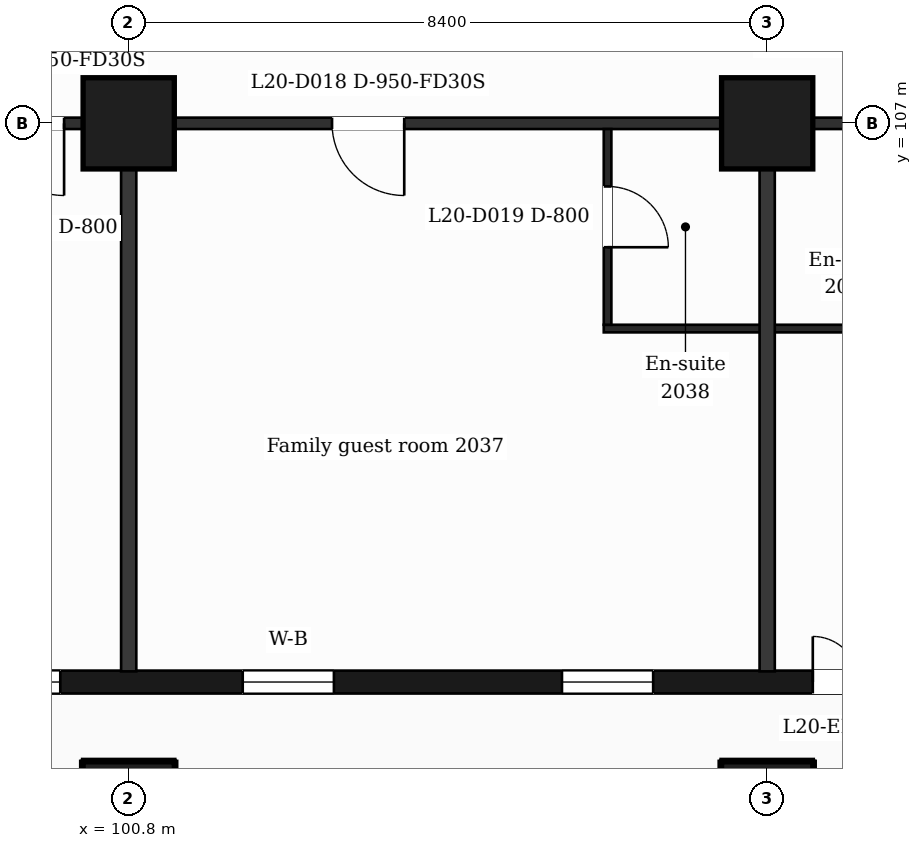
"""IFC4 building model, lengths in metres.
Left out: names, types, materials, properties, quantities, classifications, styles, units other than length and angle.
Written with IfcOpenShell. Run it as: python <this file> out.ifc"""

import sys

from ifc_helpers import new_model, si_unit, direction, frame, frame_2d, origin, origin_2d, place, context, subcontext, project, spatial, rectangle, extrude, element, fill, save


model = new_model("IFC4")
c1 = context("Model", 3, precision=1e-05, world=origin(), true_north=direction((0.0, 1.0)))
c2 = subcontext(c1, "Body", "Model", "MODEL_VIEW")
j1 = project(units=[si_unit("LENGTHUNIT", "METRE"), si_unit("PLANEANGLEUNIT", "RADIAN")], contexts=[c1])
p1 = place(None, origin())
s1 = spatial("IfcSite", under=j1, at=p1, CompositionType="ELEMENT")
p2 = place(p1, origin())
s2 = spatial("IfcBuilding", under=s1, at=p2, CompositionType="ELEMENT")
p3 = place(p2, frame((0.0, 0.0, 91.0)))
s3 = spatial("IfcBuildingStorey", under=s2, at=p3, CompositionType="ELEMENT", Elevation=91.0)
for number, where, z_axis, x_axis in (
    (1, (100.8, 98.0, 0.0), (0.0, 0.0, 1.0), (1.0, 0.0, 0.0)),
    (2, (109.2, 98.0, 0.0), (0.0, 0.0, 1.0), (1.0, 0.0, 0.0)),
    (3, (100.8, 107.0, 0.0), (0.0, 0.0, 1.0), (1.0, 0.0, 0.0)),
    (4, (109.2, 107.0, 0.0), (0.0, 0.0, 1.0), (1.0, 0.0, 0.0)),
):
    element("IfcColumn", number, at=place(p3, frame(where, z_axis=z_axis, x_axis=x_axis)), inside=s3, PredefinedType="COLUMN", context=c2, shape_type="SweptSolid", body=[
        extrude(rectangle(XDim=1.2, YDim=1.2, at=origin_2d()), origin(), (0.0, 0.0, 1.0), 3.7),
    ])
p4 = place(p3, frame((89.85, 99.65, 0.0), z_axis=(0.0, 0.0, 1.0), x_axis=(1.0, 0.0, 0.0)))
e5 = element("IfcWall", 5, at=p4, inside=s3, PredefinedType="SOLIDWALL", context=c2, shape_type="SweptSolid", body=[
    extrude(rectangle(XDim=47.25, YDim=0.3, at=frame_2d((23.625, 0.0))), origin(), (0.0, 0.0, 1.0), 3.38),
])
p5 = place(p4, frame((0.725, 0.0, 0.9)))
e6 = element("IfcOpeningElement", 6, at=p5, cuts=e5, PredefinedType="OPENING", context=c2, shape_type="SweptSolid", body=[
    extrude(rectangle(XDim=1.2, YDim=2.1, at=frame_2d((0.6, 1.05))), frame((0.0, 0.16, 0.0), z_axis=(0.0, -1.0, 0.0), x_axis=(1.0, 0.0, 0.0)), (0.0, 0.0, 1.0), 0.32),
])
p6 = place(p4, frame((3.45, 0.0, 0.9)))
e7 = element("IfcOpeningElement", 7, at=p6, cuts=e5, PredefinedType="OPENING", context=c2, shape_type="SweptSolid", body=[
    extrude(rectangle(XDim=2.4, YDim=2.1, at=frame_2d((1.2, 1.05))), frame((0.0, 0.16, 0.0), z_axis=(0.0, -1.0, 0.0), x_axis=(1.0, 0.0, 0.0)), (0.0, 0.0, 1.0), 0.32),
])
p7 = place(p4, frame((7.65, 0.0, 0.9)))
e8 = element("IfcOpeningElement", 8, at=p7, cuts=e5, PredefinedType="OPENING", context=c2, shape_type="SweptSolid", body=[
    extrude(rectangle(XDim=2.4, YDim=2.1, at=frame_2d((1.2, 1.05))), frame((0.0, 0.16, 0.0), z_axis=(0.0, -1.0, 0.0), x_axis=(1.0, 0.0, 0.0)), (0.0, 0.0, 1.0), 0.32),
])
p8 = place(p4, frame((12.45, 0.0, 0.9)))
e9 = element("IfcOpeningElement", 9, at=p8, cuts=e5, PredefinedType="OPENING", context=c2, shape_type="SweptSolid", body=[
    extrude(rectangle(XDim=1.2, YDim=2.1, at=frame_2d((0.6, 1.05))), frame((0.0, 0.16, 0.0), z_axis=(0.0, -1.0, 0.0), x_axis=(1.0, 0.0, 0.0)), (0.0, 0.0, 1.0), 0.32),
])
p9 = place(p4, frame((16.65, 0.0, 0.9)))
e10 = element("IfcOpeningElement", 10, at=p9, cuts=e5, PredefinedType="OPENING", context=c2, shape_type="SweptSolid", body=[
    extrude(rectangle(XDim=1.2, YDim=2.1, at=frame_2d((0.6, 1.05))), frame((0.0, 0.16, 0.0), z_axis=(0.0, -1.0, 0.0), x_axis=(1.0, 0.0, 0.0)), (0.0, 0.0, 1.0), 0.32),
])
p10 = place(p4, frame((19.95, 0.0, 0.0)))
e11 = element("IfcOpeningElement", 11, at=p10, cuts=e5, PredefinedType="OPENING", context=c2, shape_type="SweptSolid", body=[
    extrude(rectangle(XDim=1.2, YDim=2.4, at=frame_2d((0.6, 1.2))), frame((0.0, 0.16, 0.0), z_axis=(0.0, -1.0, 0.0), x_axis=(1.0, 0.0, 0.0)), (0.0, 0.0, 1.0), 0.32),
])
p11 = place(p4, frame((21.75, 0.0, 0.9)))
e12 = element("IfcOpeningElement", 12, at=p11, cuts=e5, PredefinedType="OPENING", context=c2, shape_type="SweptSolid", body=[
    extrude(rectangle(XDim=1.2, YDim=2.1, at=frame_2d((0.6, 1.05))), frame((0.0, 0.16, 0.0), z_axis=(0.0, -1.0, 0.0), x_axis=(1.0, 0.0, 0.0)), (0.0, 0.0, 1.0), 0.32),
])
p12 = place(p4, frame((24.45, 0.0, 0.9)))
e13 = element("IfcOpeningElement", 13, at=p12, cuts=e5, PredefinedType="OPENING", context=c2, shape_type="SweptSolid", body=[
    extrude(rectangle(XDim=2.4, YDim=2.1, at=frame_2d((1.2, 1.05))), frame((0.0, 0.16, 0.0), z_axis=(0.0, -1.0, 0.0), x_axis=(1.0, 0.0, 0.0)), (0.0, 0.0, 1.0), 0.32),
])
p13 = place(p4, frame((28.35, 0.0, 0.0)))
e14 = element("IfcOpeningElement", 14, at=p13, cuts=e5, PredefinedType="OPENING", context=c2, shape_type="SweptSolid", body=[
    extrude(rectangle(XDim=1.2, YDim=2.4, at=frame_2d((0.6, 1.2))), frame((0.0, 0.16, 0.0), z_axis=(0.0, -1.0, 0.0), x_axis=(1.0, 0.0, 0.0)), (0.0, 0.0, 1.0), 0.32),
])
p14 = place(p4, frame((30.15, 0.0, 0.9)))
e15 = element("IfcOpeningElement", 15, at=p14, cuts=e5, PredefinedType="OPENING", context=c2, shape_type="SweptSolid", body=[
    extrude(rectangle(XDim=1.2, YDim=2.1, at=frame_2d((0.6, 1.05))), frame((0.0, 0.16, 0.0), z_axis=(0.0, -1.0, 0.0), x_axis=(1.0, 0.0, 0.0)), (0.0, 0.0, 1.0), 0.32),
])
p15 = place(p4, frame((32.85, 0.0, 0.9)))
e16 = element("IfcOpeningElement", 16, at=p15, cuts=e5, PredefinedType="OPENING", context=c2, shape_type="SweptSolid", body=[
    extrude(rectangle(XDim=2.4, YDim=2.1, at=frame_2d((1.2, 1.05))), frame((0.0, 0.16, 0.0), z_axis=(0.0, -1.0, 0.0), x_axis=(1.0, 0.0, 0.0)), (0.0, 0.0, 1.0), 0.32),
])
p16 = place(p4, frame((37.05, 0.0, 0.9)))
e17 = element("IfcOpeningElement", 17, at=p16, cuts=e5, PredefinedType="OPENING", context=c2, shape_type="SweptSolid", body=[
    extrude(rectangle(XDim=2.4, YDim=2.1, at=frame_2d((1.2, 1.05))), frame((0.0, 0.16, 0.0), z_axis=(0.0, -1.0, 0.0), x_axis=(1.0, 0.0, 0.0)), (0.0, 0.0, 1.0), 0.32),
])
p17 = place(p4, frame((41.85, 0.0, 0.9)))
e18 = element("IfcOpeningElement", 18, at=p17, cuts=e5, PredefinedType="OPENING", context=c2, shape_type="SweptSolid", body=[
    extrude(rectangle(XDim=1.2, YDim=2.1, at=frame_2d((0.6, 1.05))), frame((0.0, 0.16, 0.0), z_axis=(0.0, -1.0, 0.0), x_axis=(1.0, 0.0, 0.0)), (0.0, 0.0, 1.0), 0.32),
])
p18 = place(p4, frame((45.25, 0.0, 0.9)))
e19 = element("IfcOpeningElement", 19, at=p18, cuts=e5, PredefinedType="OPENING", context=c2, shape_type="SweptSolid", body=[
    extrude(rectangle(XDim=1.2, YDim=2.1, at=frame_2d((0.6, 1.05))), frame((0.0, 0.16, 0.0), z_axis=(0.0, -1.0, 0.0), x_axis=(1.0, 0.0, 0.0)), (0.0, 0.0, 1.0), 0.32),
])
p19 = place(p3, frame((107.05, 104.3, 0.0), z_axis=(0.0, 0.0, 1.0), x_axis=(1.0, 0.0, 0.0)))
e20 = element("IfcWall", 20, at=p19, inside=s3, PredefinedType="PARTITIONING", context=c2, shape_type="SweptSolid", body=[
    extrude(rectangle(XDim=4.3, YDim=0.1, at=frame_2d((2.15, 0.0))), origin(), (0.0, 0.0, 1.0), 3.38),
])
p20 = place(p3, frame((87.018, 107.0, 0.0), z_axis=(0.0, 0.0, 1.0), x_axis=(1.0, 0.0, 0.0)))
e21 = element("IfcWall", 21, at=p20, inside=s3, PredefinedType="PARTITIONING", context=c2, shape_type="SweptSolid", body=[
    extrude(rectangle(XDim=52.765, YDim=0.15, at=frame_2d((26.382, 0.0))), origin(), (0.0, 0.0, 1.0), 3.38),
])
p21 = place(p20, frame((1.276, 0.0, 0.0)))
e22 = element("IfcOpeningElement", 22, at=p21, cuts=e21, PredefinedType="OPENING", context=c2, shape_type="SweptSolid", body=[
    extrude(rectangle(XDim=0.95, YDim=2.1, at=frame_2d((0.475, 1.05))), frame((0.0, 0.085, 0.0), z_axis=(0.0, -1.0, 0.0), x_axis=(1.0, 0.0, 0.0)), (0.0, 0.0, 1.0), 0.17),
])
p22 = place(p20, frame((6.752, 0.0, 0.0)))
e23 = element("IfcOpeningElement", 23, at=p22, cuts=e21, PredefinedType="OPENING", context=c2, shape_type="SweptSolid", body=[
    extrude(rectangle(XDim=0.95, YDim=2.1, at=frame_2d((0.475, 1.05))), frame((0.0, 0.085, 0.0), z_axis=(0.0, -1.0, 0.0), x_axis=(1.0, 0.0, 0.0)), (0.0, 0.0, 1.0), 0.17),
])
p23 = place(p20, frame((11.982, 0.0, 0.0)))
e24 = element("IfcOpeningElement", 24, at=p23, cuts=e21, PredefinedType="OPENING", context=c2, shape_type="SweptSolid", body=[
    extrude(rectangle(XDim=0.95, YDim=2.1, at=frame_2d((0.475, 1.05))), frame((0.0, 0.085, 0.0), z_axis=(0.0, -1.0, 0.0), x_axis=(1.0, 0.0, 0.0)), (0.0, 0.0, 1.0), 0.17),
])
p24 = place(p20, frame((16.457, 0.0, 0.0)))
e25 = element("IfcOpeningElement", 25, at=p24, cuts=e21, PredefinedType="OPENING", context=c2, shape_type="SweptSolid", body=[
    extrude(rectangle(XDim=0.95, YDim=2.1, at=frame_2d((0.475, 1.05))), frame((0.0, 0.085, 0.0), z_axis=(0.0, -1.0, 0.0), x_axis=(1.0, 0.0, 0.0)), (0.0, 0.0, 1.0), 0.17),
])
p25 = place(p20, frame((24.857, 0.0, 0.0)))
e26 = element("IfcOpeningElement", 26, at=p25, cuts=e21, PredefinedType="OPENING", context=c2, shape_type="SweptSolid", body=[
    extrude(rectangle(XDim=0.95, YDim=2.1, at=frame_2d((0.475, 1.05))), frame((0.0, 0.085, 0.0), z_axis=(0.0, -1.0, 0.0), x_axis=(1.0, 0.0, 0.0)), (0.0, 0.0, 1.0), 0.17),
])
p26 = place(p20, frame((26.845, 0.0, 0.0)))
e27 = element("IfcOpeningElement", 27, at=p26, cuts=e21, PredefinedType="OPENING", context=c2, shape_type="SweptSolid", body=[
    extrude(rectangle(XDim=0.95, YDim=2.1, at=frame_2d((0.475, 1.05))), frame((0.0, 0.085, 0.0), z_axis=(0.0, -1.0, 0.0), x_axis=(1.0, 0.0, 0.0)), (0.0, 0.0, 1.0), 0.17),
])
p27 = place(p20, frame((33.557, 0.0, 0.0)))
e28 = element("IfcOpeningElement", 28, at=p27, cuts=e21, PredefinedType="OPENING", context=c2, shape_type="SweptSolid", body=[
    extrude(rectangle(XDim=0.95, YDim=2.1, at=frame_2d((0.475, 1.05))), frame((0.0, 0.085, 0.0), z_axis=(0.0, -1.0, 0.0), x_axis=(1.0, 0.0, 0.0)), (0.0, 0.0, 1.0), 0.17),
])
p28 = place(p20, frame((35.47, 0.0, 0.0)))
e29 = element("IfcOpeningElement", 29, at=p28, cuts=e21, PredefinedType="OPENING", context=c2, shape_type="SweptSolid", body=[
    extrude(rectangle(XDim=0.95, YDim=2.1, at=frame_2d((0.475, 1.05))), frame((0.0, 0.085, 0.0), z_axis=(0.0, -1.0, 0.0), x_axis=(1.0, 0.0, 0.0)), (0.0, 0.0, 1.0), 0.17),
])
p29 = place(p20, frame((41.432, 0.0, 0.0)))
e30 = element("IfcOpeningElement", 30, at=p29, cuts=e21, PredefinedType="OPENING", context=c2, shape_type="SweptSolid", body=[
    extrude(rectangle(XDim=0.95, YDim=2.1, at=frame_2d((0.475, 1.05))), frame((0.0, 0.085, 0.0), z_axis=(0.0, -1.0, 0.0), x_axis=(1.0, 0.0, 0.0)), (0.0, 0.0, 1.0), 0.17),
])
p30 = place(p20, frame((43.882, 0.0, 0.0)))
e31 = element("IfcOpeningElement", 31, at=p30, cuts=e21, PredefinedType="OPENING", context=c2, shape_type="SweptSolid", body=[
    extrude(rectangle(XDim=1.0, YDim=2.1, at=frame_2d((0.5, 1.05))), frame((0.0, 0.085, 0.0), z_axis=(0.0, -1.0, 0.0), x_axis=(1.0, 0.0, 0.0)), (0.0, 0.0, 1.0), 0.17),
])
p31 = place(p20, frame((48.974, 0.0, 0.0)))
e32 = element("IfcOpeningElement", 32, at=p31, cuts=e21, PredefinedType="OPENING", context=c2, shape_type="SweptSolid", body=[
    extrude(rectangle(XDim=0.95, YDim=2.1, at=frame_2d((0.475, 1.05))), frame((0.0, 0.085, 0.0), z_axis=(0.0, -1.0, 0.0), x_axis=(1.0, 0.0, 0.0)), (0.0, 0.0, 1.0), 0.17),
])
p32 = place(p3, frame((100.8, 99.79, 0.0), z_axis=(0.0, 0.0, 1.0), x_axis=(0.0, 1.0, 0.0)))
e33 = element("IfcWall", 33, at=p32, inside=s3, PredefinedType="PARTITIONING", context=c2, shape_type="SweptSolid", body=[
    extrude(rectangle(XDim=7.135, YDim=0.2, at=frame_2d((3.567, 0.0))), origin(), (0.0, 0.0, 1.0), 3.38),
])
p33 = place(p3, frame((107.1, 104.35, 0.0), z_axis=(0.0, 0.0, 1.0), x_axis=(0.0, 1.0, 0.0)))
e34 = element("IfcWall", 34, at=p33, inside=s3, PredefinedType="PARTITIONING", context=c2, shape_type="SweptSolid", body=[
    extrude(rectangle(XDim=2.575, YDim=0.1, at=frame_2d((1.288, 0.0))), origin(), (0.0, 0.0, 1.0), 3.38),
])
p34 = place(p33, frame((1.02, 0.0, 0.0)))
e35 = element("IfcOpeningElement", 35, at=p34, cuts=e34, PredefinedType="OPENING", context=c2, shape_type="SweptSolid", body=[
    extrude(rectangle(XDim=0.8, YDim=2.1, at=frame_2d((0.4, 1.05))), frame((0.0, 0.06, 0.0), z_axis=(0.0, -1.0, 0.0), x_axis=(1.0, 0.0, 0.0)), (0.0, 0.0, 1.0), 0.12),
])
p35 = place(p3, frame((109.2, 99.79, 0.0), z_axis=(0.0, 0.0, 1.0), x_axis=(0.0, 1.0, 0.0)))
e36 = element("IfcWall", 36, at=p35, inside=s3, PredefinedType="PARTITIONING", context=c2, shape_type="SweptSolid", body=[
    extrude(rectangle(XDim=7.135, YDim=0.2, at=frame_2d((3.567, 0.0))), origin(), (0.0, 0.0, 1.0), 3.38),
])
p36 = place(p7, origin())
e37 = element("IfcWindow", 37, at=p36, inside=s3, PartitioningType="SINGLE_PANEL", PredefinedType="WINDOW", context=c2, shape_type="SweptSolid", body=[
    extrude(rectangle(XDim=2.4, YDim=2.1, at=frame_2d((1.2, 1.05))), frame((0.0, 0.03, 0.0), z_axis=(0.0, -1.0, 0.0), x_axis=(1.0, 0.0, 0.0)), (0.0, 0.0, 1.0), 0.06),
])
fill(e8, e37)
p37 = place(p8, origin())
e38 = element("IfcWindow", 38, at=p37, inside=s3, PartitioningType="SINGLE_PANEL", PredefinedType="WINDOW", context=c2, shape_type="SweptSolid", body=[
    extrude(rectangle(XDim=1.2, YDim=2.1, at=frame_2d((0.6, 1.05))), frame((0.0, 0.03, 0.0), z_axis=(0.0, -1.0, 0.0), x_axis=(1.0, 0.0, 0.0)), (0.0, 0.0, 1.0), 0.06),
])
fill(e9, e38)
p38 = place(p9, origin())
e39 = element("IfcWindow", 39, at=p38, inside=s3, PartitioningType="SINGLE_PANEL", PredefinedType="WINDOW", context=c2, shape_type="SweptSolid", body=[
    extrude(rectangle(XDim=1.2, YDim=2.1, at=frame_2d((0.6, 1.05))), frame((0.0, 0.03, 0.0), z_axis=(0.0, -1.0, 0.0), x_axis=(1.0, 0.0, 0.0)), (0.0, 0.0, 1.0), 0.06),
])
fill(e10, e39)
p39 = place(p10, origin())
e40 = element("IfcDoor", 40, at=p39, inside=s3, OperationType="DOUBLE_DOOR_SINGLE_SWING", PredefinedType="DOOR", context=c2, shape_type="SweptSolid", body=[
    extrude(rectangle(XDim=1.2, YDim=2.4, at=frame_2d((0.6, 1.2))), frame((0.0, 0.025, 0.0), z_axis=(0.0, -1.0, 0.0), x_axis=(1.0, 0.0, 0.0)), (0.0, 0.0, 1.0), 0.05),
])
fill(e11, e40)
p40 = place(p23, origin())
e41 = element("IfcDoor", 41, at=p40, inside=s3, OperationType="SINGLE_SWING_RIGHT", PredefinedType="DOOR", context=c2, shape_type="SweptSolid", body=[
    extrude(rectangle(XDim=0.95, YDim=2.1, at=frame_2d((0.475, 1.05))), frame((0.0, 0.025, 0.0), z_axis=(0.0, -1.0, 0.0), x_axis=(1.0, 0.0, 0.0)), (0.0, 0.0, 1.0), 0.05),
])
fill(e24, e41)
p41 = place(p24, origin())
e42 = element("IfcDoor", 42, at=p41, inside=s3, OperationType="SINGLE_SWING_RIGHT", PredefinedType="DOOR", context=c2, shape_type="SweptSolid", body=[
    extrude(rectangle(XDim=0.95, YDim=2.1, at=frame_2d((0.475, 1.05))), frame((0.0, 0.025, 0.0), z_axis=(0.0, -1.0, 0.0), x_axis=(1.0, 0.0, 0.0)), (0.0, 0.0, 1.0), 0.05),
])
fill(e25, e42)
p42 = place(p34, origin())
e43 = element("IfcDoor", 43, at=p42, inside=s3, OperationType="SINGLE_SWING_LEFT", PredefinedType="DOOR", context=c2, shape_type="SweptSolid", body=[
    extrude(rectangle(XDim=0.8, YDim=2.1, at=frame_2d((0.4, 1.05))), frame((0.0, 0.025, 0.0), z_axis=(0.0, -1.0, 0.0), x_axis=(1.0, 0.0, 0.0)), (0.0, 0.0, 1.0), 0.05),
])
fill(e35, e43)
save(model, sys.argv[1])
